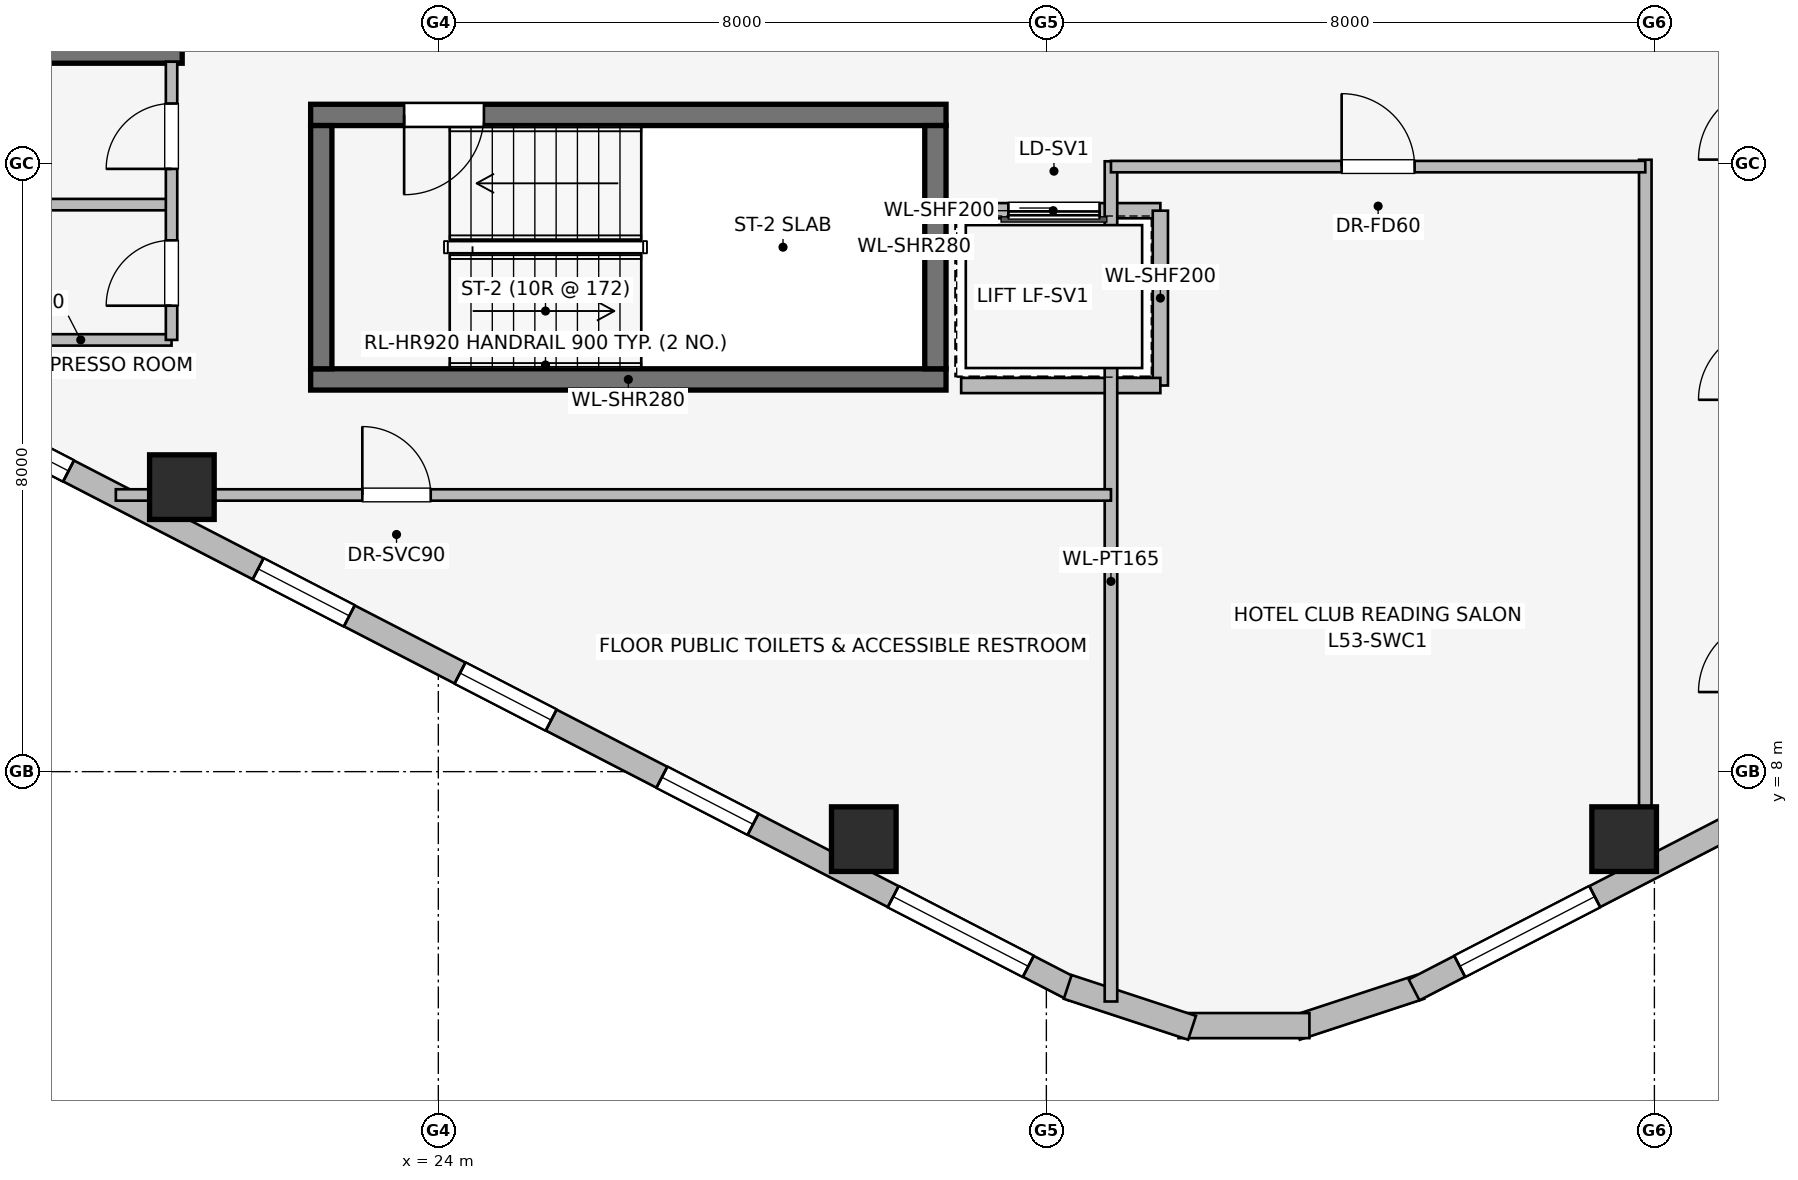
"""IFC4 building model, lengths in metres.
Left out: names, types, materials, properties, quantities, classifications, styles, units other than length and angle.
Written with IfcOpenShell. Run it as: python <this file> out.ifc"""

import sys

from ifc_helpers import new_model, si_unit, direction, frame, frame_2d, origin, origin_2d, place, context, subcontext, project, spatial, rectangle, extrude, element, fill, save


model = new_model("IFC4")
c1 = context("Model", 3, precision=1e-05, world=origin(), true_north=direction((0.0, 1.0)))
c2 = subcontext(c1, "Body", "Model", "MODEL_VIEW")
j1 = project(units=[si_unit("LENGTHUNIT", "METRE"), si_unit("PLANEANGLEUNIT", "RADIAN")], contexts=[c1])
p1 = place(None, origin())
s1 = spatial("IfcSite", under=j1, at=p1, CompositionType="ELEMENT")
p2 = place(p1, origin())
s2 = spatial("IfcBuilding", under=s1, at=p2, CompositionType="ELEMENT")
p3 = place(p2, frame((0.0, 0.0, 196.45)))
s3 = spatial("IfcBuildingStorey", under=s2, at=p3, CompositionType="ELEMENT", Elevation=196.45)
p4 = place(p3, frame((16.87, 17.46, 0.0), z_axis=(0.0, 0.0, 1.0), x_axis=(1.0, 0.0, 0.0)))
e1 = element("IfcWall", 1, at=p4, inside=s3, PredefinedType="SHEAR", context=c2, shape_type="SweptSolid", body=[
    extrude(rectangle(XDim=3.76, YDim=0.28, at=frame_2d((1.88, 0.0))), origin(), (0.0, 0.0, 1.0), 3.45),
])
p5 = place(p3, frame((22.32, 13.16, 0.0), z_axis=(0.0, 0.0, 1.0), x_axis=(1.0, 0.0, 0.0)))
e2 = element("IfcWall", 2, at=p5, inside=s3, PredefinedType="SHEAR", context=c2, shape_type="SweptSolid", body=[
    extrude(rectangle(XDim=8.36, YDim=0.28, at=frame_2d((4.18, 0.0))), origin(), (0.0, 0.0, 1.0), 3.45),
])
p6 = place(p3, frame((30.68, 16.64, 0.0), z_axis=(0.0, 0.0, 1.0), x_axis=(-1.0, 0.0, 0.0)))
e3 = element("IfcWall", 3, at=p6, inside=s3, PredefinedType="SHEAR", context=c2, shape_type="SweptSolid", body=[
    extrude(rectangle(XDim=8.36, YDim=0.28, at=frame_2d((4.18, 0.0))), origin(), (0.0, 0.0, 1.0), 3.45),
])
p7 = place(p6, frame((6.08, 0.0, 0.0)))
e4 = element("IfcOpeningElement", 4, at=p7, cuts=e3, PredefinedType="OPENING", context=c2, shape_type="SweptSolid", body=[
    extrude(rectangle(XDim=1.05, YDim=2.0, at=frame_2d((0.525, 1.0))), frame((0.0, 0.15, 0.0), z_axis=(0.0, -1.0, 0.0), x_axis=(1.0, 0.0, 0.0)), (0.0, 0.0, 1.0), 0.3),
])
for number, where, z_axis, x_axis in (
    (5, (22.46, 16.5, 0.0), (0.0, 0.0, 1.0), (0.0, -1.0, 0.0)),
    (6, (30.54, 13.3, 0.0), (0.0, 0.0, 1.0), (0.0, 1.0, 0.0)),
):
    element("IfcWall", number, at=place(p3, frame(where, z_axis=z_axis, x_axis=x_axis)), inside=s3, PredefinedType="SHEAR", context=c2, shape_type="SweptSolid", body=[
        extrude(rectangle(XDim=3.2, YDim=0.28, at=frame_2d((1.6, 0.0))), origin(), (0.0, 0.0, 1.0), 3.45),
    ])
for number, where, z_axis, x_axis in (
    (7, (20.626, 11.743, 0.0), (0.0, 0.0, 1.0), (1.0, 0.0, 0.0)),
    (8, (29.598, 7.112, 0.0), (0.0, 0.0, 1.0), (1.0, 0.0, 0.0)),
    (9, (39.602, 7.112, 0.0), (0.0, 0.0, 1.0), (1.0, 0.0, 0.0)),
):
    element("IfcColumn", number, at=place(p3, frame(where, z_axis=z_axis, x_axis=x_axis)), inside=s3, PredefinedType="COLUMN", context=c2, shape_type="SweptSolid", body=[
        extrude(rectangle(XDim=0.85, YDim=0.85, at=origin_2d()), origin(), (0.0, 0.0, 1.0), 3.45),
    ])
p8 = place(p3, frame((32.362, 5.129, 0.0), z_axis=(0.0, 0.0, 1.0), x_axis=(-0.888626188278, 0.458632202867, 0.0)))
e10 = element("IfcWall", 10, at=p8, inside=s3, PredefinedType="STANDARD", context=c2, shape_type="SweptSolid", body=[
    extrude(rectangle(XDim=16.828, YDim=0.31, at=frame_2d((8.414, 0.0))), origin(), (0.0, 0.0, 1.0), 3.19),
])
p9 = place(p8, frame((0.675, 0.0, 0.75)))
e11 = element("IfcOpeningElement", 11, at=p9, cuts=e10, PredefinedType="OPENING", context=c2, shape_type="SweptSolid", body=[
    extrude(rectangle(XDim=2.0, YDim=1.5, at=frame_2d((1.0, 0.75))), frame((0.0, 0.165, 0.0), z_axis=(0.0, -1.0, 0.0), x_axis=(1.0, 0.0, 0.0)), (0.0, 0.0, 1.0), 0.33),
])
p10 = place(p8, frame((4.75, 0.0, 0.75)))
e12 = element("IfcOpeningElement", 12, at=p10, cuts=e10, PredefinedType="OPENING", context=c2, shape_type="SweptSolid", body=[
    extrude(rectangle(XDim=1.35, YDim=1.45, at=frame_2d((0.675, 0.725))), frame((0.0, 0.165, 0.0), z_axis=(0.0, -1.0, 0.0), x_axis=(1.0, 0.0, 0.0)), (0.0, 0.0, 1.0), 0.33),
])
p11 = place(p8, frame((7.739, 0.0, 0.75)))
e13 = element("IfcOpeningElement", 13, at=p11, cuts=e10, PredefinedType="OPENING", context=c2, shape_type="SweptSolid", body=[
    extrude(rectangle(XDim=1.35, YDim=1.45, at=frame_2d((0.675, 0.725))), frame((0.0, 0.165, 0.0), z_axis=(0.0, -1.0, 0.0), x_axis=(1.0, 0.0, 0.0)), (0.0, 0.0, 1.0), 0.33),
])
p12 = place(p8, frame((10.728, 0.0, 0.75)))
e14 = element("IfcOpeningElement", 14, at=p12, cuts=e10, PredefinedType="OPENING", context=c2, shape_type="SweptSolid", body=[
    extrude(rectangle(XDim=1.35, YDim=1.45, at=frame_2d((0.675, 0.725))), frame((0.0, 0.165, 0.0), z_axis=(0.0, -1.0, 0.0), x_axis=(1.0, 0.0, 0.0)), (0.0, 0.0, 1.0), 0.33),
])
p13 = place(p8, frame((14.885, 0.0, 0.75)))
e15 = element("IfcOpeningElement", 15, at=p13, cuts=e10, PredefinedType="OPENING", context=c2, shape_type="SweptSolid", body=[
    extrude(rectangle(XDim=1.05, YDim=1.4, at=frame_2d((0.525, 0.7))), frame((0.0, 0.165, 0.0), z_axis=(0.0, -1.0, 0.0), x_axis=(1.0, 0.0, 0.0)), (0.0, 0.0, 1.0), 0.33),
])
p14 = place(p3, frame((36.919, 5.168, 0.0), z_axis=(0.0, 0.0, 1.0), x_axis=(-0.949937416267, -0.312440242569, 0.0)))
e16 = element("IfcWall", 16, at=p14, inside=s3, PredefinedType="STANDARD", context=c2, shape_type="SweptSolid", body=[
    extrude(rectangle(XDim=1.722, YDim=0.33, at=frame_2d((0.861, 0.0))), origin(), (0.0, 0.0, 1.0), 3.19),
])
p15 = place(p3, frame((35.461, 4.659, 0.0), z_axis=(0.0, 0.0, 1.0), x_axis=(-1.0, 0.0, 0.0)))
e17 = element("IfcWall", 17, at=p15, inside=s3, PredefinedType="STANDARD", context=c2, shape_type="SweptSolid", body=[
    extrude(rectangle(XDim=1.722, YDim=0.33, at=frame_2d((0.861, 0.0))), origin(), (0.0, 0.0, 1.0), 3.19),
])
p16 = place(p3, frame((33.917, 4.63, 0.0), z_axis=(0.0, 0.0, 1.0), x_axis=(-0.949937416267, 0.312440242569, 0.0)))
e18 = element("IfcWall", 18, at=p16, inside=s3, PredefinedType="STANDARD", context=c2, shape_type="SweptSolid", body=[
    extrude(rectangle(XDim=1.722, YDim=0.33, at=frame_2d((0.861, 0.0))), origin(), (0.0, 0.0, 1.0), 3.19),
])
p17 = place(p3, frame((51.792, 12.847, 0.0), z_axis=(0.0, 0.0, 1.0), x_axis=(-0.888626188278, -0.458632202867, 0.0)))
e19 = element("IfcWall", 19, at=p17, inside=s3, PredefinedType="STANDARD", context=c2, shape_type="SweptSolid", body=[
    extrude(rectangle(XDim=16.828, YDim=0.31, at=frame_2d((8.414, 0.0))), origin(), (0.0, 0.0, 1.0), 3.19),
])
p18 = place(p17, frame((0.729, 0.0, 0.75)))
e20 = element("IfcOpeningElement", 20, at=p18, cuts=e19, PredefinedType="OPENING", context=c2, shape_type="SweptSolid", body=[
    extrude(rectangle(XDim=1.05, YDim=1.4, at=frame_2d((0.525, 0.7))), frame((0.0, 0.165, 0.0), z_axis=(0.0, -1.0, 0.0), x_axis=(1.0, 0.0, 0.0)), (0.0, 0.0, 1.0), 0.33),
])
p19 = place(p17, frame((4.486, 0.0, 0.75)))
e21 = element("IfcOpeningElement", 21, at=p19, cuts=e19, PredefinedType="OPENING", context=c2, shape_type="SweptSolid", body=[
    extrude(rectangle(XDim=1.35, YDim=1.45, at=frame_2d((0.675, 0.725))), frame((0.0, 0.165, 0.0), z_axis=(0.0, -1.0, 0.0), x_axis=(1.0, 0.0, 0.0)), (0.0, 0.0, 1.0), 0.33),
])
p20 = place(p17, frame((6.946, 0.0, 0.75)))
e22 = element("IfcOpeningElement", 22, at=p20, cuts=e19, PredefinedType="OPENING", context=c2, shape_type="SweptSolid", body=[
    extrude(rectangle(XDim=1.35, YDim=1.45, at=frame_2d((0.675, 0.725))), frame((0.0, 0.165, 0.0), z_axis=(0.0, -1.0, 0.0), x_axis=(1.0, 0.0, 0.0)), (0.0, 0.0, 1.0), 0.33),
])
p21 = place(p17, frame((9.406, 0.0, 0.75)))
e23 = element("IfcOpeningElement", 23, at=p21, cuts=e19, PredefinedType="OPENING", context=c2, shape_type="SweptSolid", body=[
    extrude(rectangle(XDim=1.35, YDim=1.45, at=frame_2d((0.675, 0.725))), frame((0.0, 0.165, 0.0), z_axis=(0.0, -1.0, 0.0), x_axis=(1.0, 0.0, 0.0)), (0.0, 0.0, 1.0), 0.33),
])
p22 = place(p17, frame((14.153, 0.0, 0.75)))
e24 = element("IfcOpeningElement", 24, at=p22, cuts=e19, PredefinedType="OPENING", context=c2, shape_type="SweptSolid", body=[
    extrude(rectangle(XDim=2.0, YDim=1.5, at=frame_2d((1.0, 0.75))), frame((0.0, 0.165, 0.0), z_axis=(0.0, -1.0, 0.0), x_axis=(1.0, 0.0, 0.0)), (0.0, 0.0, 1.0), 0.33),
])
p23 = place(p3, frame((33.5, 15.38, 0.0), z_axis=(0.0, 0.0, 1.0), x_axis=(-1.0, 0.0, 0.0)))
e25 = element("IfcWall", 25, at=p23, inside=s3, PredefinedType="PARTITIONING", context=c2, shape_type="SweptSolid", body=[
    extrude(rectangle(XDim=2.82, YDim=0.2, at=frame_2d((1.41, 0.0))), origin(), (0.0, 0.0, 1.0), 3.19),
])
p24 = place(p23, frame((0.8, 0.0, 0.0)))
e26 = element("IfcOpeningElement", 26, at=p24, cuts=e25, PredefinedType="OPENING", context=c2, shape_type="SweptSolid", body=[
    extrude(rectangle(XDim=1.2, YDim=2.2, at=frame_2d((0.6, 1.1))), frame((0.0, 0.11, 0.0), z_axis=(0.0, -1.0, 0.0), x_axis=(1.0, 0.0, 0.0)), (0.0, 0.0, 1.0), 0.22),
])
p25 = place(p3, frame((33.5, 13.08, 0.0), z_axis=(0.0, 0.0, 1.0), x_axis=(0.0, 1.0, 0.0)))
e27 = element("IfcWall", 27, at=p25, inside=s3, PredefinedType="PARTITIONING", context=c2, shape_type="SweptSolid", body=[
    extrude(rectangle(XDim=2.3, YDim=0.2, at=frame_2d((1.15, 0.0))), origin(), (0.0, 0.0, 1.0), 3.19),
])
p26 = place(p3, frame((30.879, 13.08, 0.0), z_axis=(0.0, 0.0, 1.0), x_axis=(1.0, 0.0, 0.0)))
e28 = element("IfcWall", 28, at=p26, inside=s3, PredefinedType="PARTITIONING", context=c2, shape_type="SweptSolid", body=[
    extrude(rectangle(XDim=2.621, YDim=0.2, at=frame_2d((1.311, 0.0))), origin(), (0.0, 0.0, 1.0), 3.19),
])
for number, where, z_axis, x_axis in (
    (29, (18.1, 13.68, 0.0), (0.0, 0.0, 1.0), (1.0, 0.0, 0.0)),
    (30, (18.1, 15.46, 0.0), (0.0, 0.0, 1.0), (1.0, 0.0, 0.0)),
):
    element("IfcWall", number, at=place(p3, frame(where, z_axis=z_axis, x_axis=x_axis)), inside=s3, PredefinedType="PARTITIONING", context=c2, shape_type="SweptSolid", body=[
        extrude(rectangle(XDim=2.39, YDim=0.15, at=frame_2d((1.195, 0.0))), origin(), (0.0, 0.0, 1.0), 3.19),
    ])
p27 = place(p3, frame((20.49, 13.68, 0.0), z_axis=(0.0, 0.0, 1.0), x_axis=(0.0, 1.0, 0.0)))
e31 = element("IfcWall", 31, at=p27, inside=s3, PredefinedType="PARTITIONING", context=c2, shape_type="SweptSolid", body=[
    extrude(rectangle(XDim=3.66, YDim=0.15, at=frame_2d((1.83, 0.0))), origin(), (0.0, 0.0, 1.0), 3.19),
])
p28 = place(p27, frame((0.45, 0.0, 0.0)))
e32 = element("IfcOpeningElement", 32, at=p28, cuts=e31, PredefinedType="OPENING", context=c2, shape_type="SweptSolid", body=[
    extrude(rectangle(XDim=0.86, YDim=2.0, at=frame_2d((0.43, 1.0))), frame((0.0, 0.085, 0.0), z_axis=(0.0, -1.0, 0.0), x_axis=(1.0, 0.0, 0.0)), (0.0, 0.0, 1.0), 0.17),
])
p29 = place(p27, frame((2.25, 0.0, 0.0)))
e33 = element("IfcOpeningElement", 33, at=p29, cuts=e31, PredefinedType="OPENING", context=c2, shape_type="SweptSolid", body=[
    extrude(rectangle(XDim=0.86, YDim=2.0, at=frame_2d((0.43, 1.0))), frame((0.0, 0.085, 0.0), z_axis=(0.0, -1.0, 0.0), x_axis=(1.0, 0.0, 0.0)), (0.0, 0.0, 1.0), 0.17),
])
p30 = place(p3, frame((32.85, 4.976, 0.0), z_axis=(0.0, 0.0, 1.0), x_axis=(0.0, 1.0, 0.0)))
e34 = element("IfcWall", 34, at=p30, inside=s3, PredefinedType="PARTITIONING", context=c2, shape_type="SweptSolid", body=[
    extrude(rectangle(XDim=11.054, YDim=0.165, at=frame_2d((5.527, 0.0))), origin(), (0.0, 0.0, 1.0), 3.19),
])
p31 = place(p3, frame((19.757, 11.64, 0.0), z_axis=(0.0, 0.0, 1.0), x_axis=(1.0, 0.0, 0.0)))
e35 = element("IfcWall", 35, at=p31, inside=s3, PredefinedType="PARTITIONING", context=c2, shape_type="SweptSolid", body=[
    extrude(rectangle(XDim=13.093, YDim=0.15, at=frame_2d((6.546, 0.0))), origin(), (0.0, 0.0, 1.0), 3.19),
])
p32 = place(p31, frame((3.243, 0.0, 0.0)))
e36 = element("IfcOpeningElement", 36, at=p32, cuts=e35, PredefinedType="OPENING", context=c2, shape_type="SweptSolid", body=[
    extrude(rectangle(XDim=0.9, YDim=2.0, at=frame_2d((0.45, 1.0))), frame((0.0, 0.085, 0.0), z_axis=(0.0, -1.0, 0.0), x_axis=(1.0, 0.0, 0.0)), (0.0, 0.0, 1.0), 0.17),
])
p33 = place(p3, frame((39.88, 6.704, 0.0), z_axis=(0.0, 0.0, 1.0), x_axis=(0.0, 1.0, 0.0)))
e37 = element("IfcWall", 37, at=p33, inside=s3, PredefinedType="PARTITIONING", context=c2, shape_type="SweptSolid", body=[
    extrude(rectangle(XDim=9.346, YDim=0.165, at=frame_2d((4.673, 0.0))), origin(), (0.0, 0.0, 1.0), 2.497),
])
p34 = place(p3, frame((32.85, 15.96, 0.0), z_axis=(0.0, 0.0, 1.0), x_axis=(1.0, 0.0, 0.0)))
e38 = element("IfcWall", 38, at=p34, inside=s3, PredefinedType="PARTITIONING", context=c2, shape_type="SweptSolid", body=[
    extrude(rectangle(XDim=7.03, YDim=0.15, at=frame_2d((3.515, 0.0))), origin(), (0.0, 0.0, 1.0), 3.19),
])
p35 = place(p34, frame((3.035, 0.0, 0.0)))
e39 = element("IfcOpeningElement", 39, at=p35, cuts=e38, PredefinedType="OPENING", context=c2, shape_type="SweptSolid", body=[
    extrude(rectangle(XDim=0.96, YDim=2.0, at=frame_2d((0.48, 1.0))), frame((0.0, 0.085, 0.0), z_axis=(0.0, -1.0, 0.0), x_axis=(1.0, 0.0, 0.0)), (0.0, 0.0, 1.0), 0.17),
])
p36 = place(p9, origin())
e40 = element("IfcWindow", 40, at=p36, inside=s3, PartitioningType="SINGLE_PANEL", PredefinedType="WINDOW", context=c2, shape_type="SweptSolid", body=[
    extrude(rectangle(XDim=2.0, YDim=1.5, at=frame_2d((1.0, 0.75))), frame((0.0, 0.03, 0.0), z_axis=(0.0, -1.0, 0.0), x_axis=(1.0, 0.0, 0.0)), (0.0, 0.0, 1.0), 0.06),
])
fill(e11, e40)
p37 = place(p10, origin())
e41 = element("IfcWindow", 41, at=p37, inside=s3, PartitioningType="SINGLE_PANEL", PredefinedType="WINDOW", context=c2, shape_type="SweptSolid", body=[
    extrude(rectangle(XDim=1.35, YDim=1.45, at=frame_2d((0.675, 0.725))), frame((0.0, 0.03, 0.0), z_axis=(0.0, -1.0, 0.0), x_axis=(1.0, 0.0, 0.0)), (0.0, 0.0, 1.0), 0.06),
])
fill(e12, e41)
p38 = place(p11, origin())
e42 = element("IfcWindow", 42, at=p38, inside=s3, PartitioningType="SINGLE_PANEL", PredefinedType="WINDOW", context=c2, shape_type="SweptSolid", body=[
    extrude(rectangle(XDim=1.35, YDim=1.45, at=frame_2d((0.675, 0.725))), frame((0.0, 0.03, 0.0), z_axis=(0.0, -1.0, 0.0), x_axis=(1.0, 0.0, 0.0)), (0.0, 0.0, 1.0), 0.06),
])
fill(e13, e42)
p39 = place(p12, origin())
e43 = element("IfcWindow", 43, at=p39, inside=s3, PartitioningType="SINGLE_PANEL", PredefinedType="WINDOW", context=c2, shape_type="SweptSolid", body=[
    extrude(rectangle(XDim=1.35, YDim=1.45, at=frame_2d((0.675, 0.725))), frame((0.0, 0.03, 0.0), z_axis=(0.0, -1.0, 0.0), x_axis=(1.0, 0.0, 0.0)), (0.0, 0.0, 1.0), 0.06),
])
fill(e14, e43)
p40 = place(p13, origin())
e44 = element("IfcWindow", 44, at=p40, inside=s3, PartitioningType="SINGLE_PANEL", PredefinedType="WINDOW", context=c2, shape_type="SweptSolid", body=[
    extrude(rectangle(XDim=1.05, YDim=1.4, at=frame_2d((0.525, 0.7))), frame((0.0, 0.03, 0.0), z_axis=(0.0, -1.0, 0.0), x_axis=(1.0, 0.0, 0.0)), (0.0, 0.0, 1.0), 0.06),
])
fill(e15, e44)
p41 = place(p22, origin())
e45 = element("IfcWindow", 45, at=p41, inside=s3, PartitioningType="SINGLE_PANEL", PredefinedType="WINDOW", context=c2, shape_type="SweptSolid", body=[
    extrude(rectangle(XDim=2.0, YDim=1.5, at=frame_2d((1.0, 0.75))), frame((0.0, 0.03, 0.0), z_axis=(0.0, -1.0, 0.0), x_axis=(1.0, 0.0, 0.0)), (0.0, 0.0, 1.0), 0.06),
])
fill(e24, e45)
p42 = place(p7, origin())
e46 = element("IfcDoor", 46, at=p42, inside=s3, OperationType="SINGLE_SWING_RIGHT", PredefinedType="DOOR", context=c2, shape_type="SweptSolid", body=[
    extrude(rectangle(XDim=1.05, YDim=2.0, at=frame_2d((0.525, 1.0))), frame((0.0, 0.025, 0.0), z_axis=(0.0, -1.0, 0.0), x_axis=(1.0, 0.0, 0.0)), (0.0, 0.0, 1.0), 0.05),
])
fill(e4, e46)
p43 = place(p24, origin())
e47 = element("IfcDoor", 47, at=p43, inside=s3, OperationType="SLIDING_TO_RIGHT", PredefinedType="DOOR", context=c2, shape_type="SweptSolid", body=[
    extrude(rectangle(XDim=1.2, YDim=2.2, at=frame_2d((0.6, 1.1))), frame((0.0, 0.025, 0.0), z_axis=(0.0, -1.0, 0.0), x_axis=(1.0, 0.0, 0.0)), (0.0, 0.0, 1.0), 0.05),
])
fill(e26, e47)
p44 = place(p28, origin())
e48 = element("IfcDoor", 48, at=p44, inside=s3, OperationType="SINGLE_SWING_LEFT", PredefinedType="DOOR", context=c2, shape_type="SweptSolid", body=[
    extrude(rectangle(XDim=0.86, YDim=2.0, at=frame_2d((0.43, 1.0))), frame((0.0, 0.025, 0.0), z_axis=(0.0, -1.0, 0.0), x_axis=(1.0, 0.0, 0.0)), (0.0, 0.0, 1.0), 0.05),
])
fill(e32, e48)
p45 = place(p29, origin())
e49 = element("IfcDoor", 49, at=p45, inside=s3, OperationType="SINGLE_SWING_LEFT", PredefinedType="DOOR", context=c2, shape_type="SweptSolid", body=[
    extrude(rectangle(XDim=0.86, YDim=2.0, at=frame_2d((0.43, 1.0))), frame((0.0, 0.025, 0.0), z_axis=(0.0, -1.0, 0.0), x_axis=(1.0, 0.0, 0.0)), (0.0, 0.0, 1.0), 0.05),
])
fill(e33, e49)
p46 = place(p32, origin())
e50 = element("IfcDoor", 50, at=p46, inside=s3, OperationType="SINGLE_SWING_LEFT", PredefinedType="DOOR", context=c2, shape_type="SweptSolid", body=[
    extrude(rectangle(XDim=0.9, YDim=2.0, at=frame_2d((0.45, 1.0))), frame((0.0, 0.025, 0.0), z_axis=(0.0, -1.0, 0.0), x_axis=(1.0, 0.0, 0.0)), (0.0, 0.0, 1.0), 0.05),
])
fill(e36, e50)
p47 = place(p35, origin())
e51 = element("IfcDoor", 51, at=p47, inside=s3, OperationType="SINGLE_SWING_LEFT", PredefinedType="DOOR", context=c2, shape_type="SweptSolid", body=[
    extrude(rectangle(XDim=0.96, YDim=2.0, at=frame_2d((0.48, 1.0))), frame((0.0, 0.025, 0.0), z_axis=(0.0, -1.0, 0.0), x_axis=(1.0, 0.0, 0.0)), (0.0, 0.0, 1.0), 0.05),
])
fill(e39, e51)
save(model, sys.argv[1])
